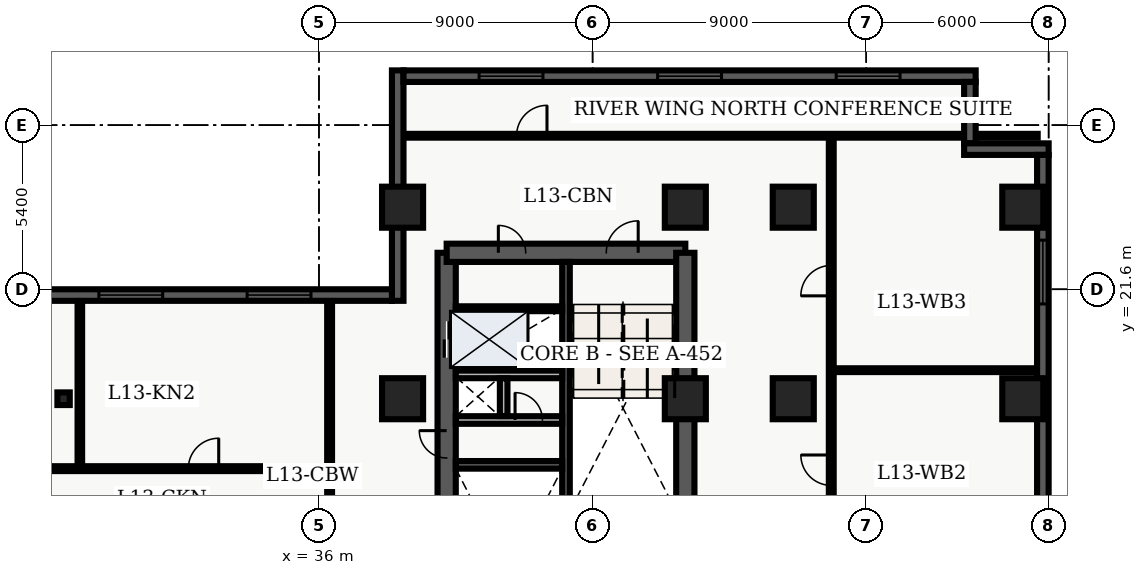
"""IFC4 building model, lengths in metres.
Left out: names, types, materials, properties, quantities, classifications, styles, units other than length and angle.
Written with IfcOpenShell. Run it as: python <this file> out.ifc"""

import sys

from ifc_helpers import new_model, entity, si_unit, converted_unit, direction, frame, origin_with_axes, origin_2d_with_axis, place, context, subcontext, project, spatial, polyline, rectangle, i_section, outline, extrude, element, fill, save


model = new_model("IFC4")
c1 = context("Model", 3, precision=1e-05, world=origin_with_axes(), true_north=direction((0.0, 1.0)))
c2 = subcontext(c1, "Body", "Model", "MODEL_VIEW")
j1 = project(units=[si_unit("LENGTHUNIT", "METRE"), converted_unit("PLANEANGLEUNIT", "DEGREE", entity("IfcPlaneAngleMeasure", 0.017), si_unit("PLANEANGLEUNIT", "RADIAN"), dimensions=[0, 0, 0, 0, 0, 0, 0])], contexts=[c1])
p1 = place(None, origin_with_axes())
s1 = spatial("IfcSite", under=j1, at=p1, CompositionType="ELEMENT")
p2 = place(p1, origin_with_axes())
s2 = spatial("IfcBuilding", under=s1, at=p2, CompositionType="ELEMENT")
p3 = place(p2, frame((0.0, 0.0, 56.1), z_axis=(0.0, 0.0, 1.0), x_axis=(1.0, 0.0, 0.0)))
s3 = spatial("IfcBuildingStorey", under=s2, at=p3, CompositionType="ELEMENT", Elevation=56.1)
p4 = place(p3, frame((40.2, 7.2, 0.0), z_axis=(0.0, 0.0, 1.0), x_axis=(0.0, 1.0, 0.0)))
e1 = element("IfcWall", 1, at=p4, inside=s3, PredefinedType="SHEAR", context=c2, shape_type="SweptSolid", body=[
    extrude(outline(polyline([(0.0, -0.3), (15.6, -0.3), (15.6, 0.3), (0.0, 0.3), (0.0, -0.3)])), origin_with_axes(), (0.0, 0.0, 1.0), 3.66),
])
p5 = place(p4, frame((12.75, 0.0, 0.0), z_axis=(0.0, 0.0, 1.0), x_axis=(1.0, 0.0, 0.0)))
e2 = element("IfcOpeningElement", 2, at=p5, cuts=e1, PredefinedType="OPENING", context=c2, shape_type="SweptSolid", body=[
    extrude(rectangle(XDim=1.2, YDim=0.62, at=origin_2d_with_axis()), origin_with_axes(), (0.0, 0.0, 1.0), 2.15),
])
p6 = place(p4, frame((9.3, 0.0, 0.0), z_axis=(0.0, 0.0, 1.0), x_axis=(1.0, 0.0, 0.0)))
e3 = element("IfcOpeningElement", 3, at=p6, cuts=e1, PredefinedType="OPENING", context=c2, shape_type="SweptSolid", body=[
    extrude(rectangle(XDim=0.9, YDim=0.62, at=origin_2d_with_axis()), origin_with_axes(), (0.0, 0.0, 1.0), 2.15),
])
p7 = place(p3, frame((40.2, 22.8, 0.0), z_axis=(0.0, 0.0, 1.0), x_axis=(1.0, 0.0, 0.0)))
e4 = element("IfcWall", 4, at=p7, inside=s3, PredefinedType="SHEAR", context=c2, shape_type="SweptSolid", body=[
    extrude(outline(polyline([(0.0, -0.3), (7.85, -0.3), (7.85, 0.3), (0.0, 0.3), (0.0, -0.3)])), origin_with_axes(), (0.0, 0.0, 1.0), 3.66),
])
p8 = place(p7, frame((5.775, 0.0, 0.0), z_axis=(0.0, 0.0, 1.0), x_axis=(1.0, 0.0, 0.0)))
e5 = element("IfcOpeningElement", 5, at=p8, cuts=e4, PredefinedType="OPENING", context=c2, shape_type="SweptSolid", body=[
    extrude(rectangle(XDim=1.05, YDim=0.62, at=origin_2d_with_axis()), origin_with_axes(), (0.0, 0.0, 1.0), 2.15),
])
p9 = place(p7, frame((2.15, 0.0, 0.0), z_axis=(0.0, 0.0, 1.0), x_axis=(1.0, 0.0, 0.0)))
e6 = element("IfcOpeningElement", 6, at=p9, cuts=e4, PredefinedType="OPENING", context=c2, shape_type="SweptSolid", body=[
    extrude(rectangle(XDim=0.9, YDim=0.62, at=origin_2d_with_axis()), origin_with_axes(), (0.0, 0.0, 1.0), 2.15),
])
p10 = place(p3, frame((48.05, 7.2, 0.0), z_axis=(0.0, 0.0, 1.0), x_axis=(0.0, 1.0, 0.0)))
e7 = element("IfcWall", 7, at=p10, inside=s3, PredefinedType="SHEAR", context=c2, shape_type="SweptSolid", body=[
    extrude(outline(polyline([(0.0, -0.3), (15.6, -0.3), (15.6, 0.3), (0.0, 0.3), (0.0, -0.3)])), origin_with_axes(), (0.0, 0.0, 1.0), 3.66),
])
p11 = place(p10, frame((1.425, 0.0, 0.0), z_axis=(0.0, 0.0, 1.0), x_axis=(1.0, 0.0, 0.0)))
e8 = element("IfcOpeningElement", 8, at=p11, cuts=e7, PredefinedType="OPENING", context=c2, shape_type="SweptSolid", body=[
    extrude(rectangle(XDim=1.05, YDim=0.62, at=origin_2d_with_axis()), origin_with_axes(), (0.0, 0.0, 1.0), 2.15),
])
p12 = place(p10, frame((3.475, 0.0, 0.0), z_axis=(0.0, 0.0, 1.0), x_axis=(1.0, 0.0, 0.0)))
e9 = element("IfcOpeningElement", 9, at=p12, cuts=e7, PredefinedType="OPENING", context=c2, shape_type="SweptSolid", body=[
    extrude(rectangle(XDim=1.05, YDim=0.62, at=origin_2d_with_axis()), origin_with_axes(), (0.0, 0.0, 1.0), 2.15),
])
p13 = place(p10, frame((5.625, 0.0, 0.0), z_axis=(0.0, 0.0, 1.0), x_axis=(1.0, 0.0, 0.0)))
e10 = element("IfcOpeningElement", 10, at=p13, cuts=e7, PredefinedType="OPENING", context=c2, shape_type="SweptSolid", body=[
    extrude(rectangle(XDim=0.95, YDim=0.62, at=origin_2d_with_axis()), origin_with_axes(), (0.0, 0.0, 1.0), 2.15),
])
p14 = place(p3, frame((44.125, 7.5, 0.0), z_axis=(0.0, 0.0, 1.0), x_axis=(0.0, 1.0, 0.0)))
e11 = element("IfcWall", 11, at=p14, inside=s3, PredefinedType="SHEAR", context=c2, shape_type="SweptSolid", body=[
    extrude(outline(polyline([(0.0, -0.125), (15.0, -0.125), (15.0, 0.125), (0.0, 0.125), (0.0, -0.125)])), origin_with_axes(), (0.0, 0.0, 1.0), 3.66),
])
p15 = place(p3, frame((40.5, 15.825, 0.0), z_axis=(0.0, 0.0, 1.0), x_axis=(1.0, 0.0, 0.0)))
e12 = element("IfcWall", 12, at=p15, inside=s3, PredefinedType="SHEAR", context=c2, shape_type="SweptSolid", body=[
    extrude(outline(polyline([(0.0, -0.125), (3.5, -0.125), (3.5, 0.125), (0.0, 0.125), (0.0, -0.125)])), origin_with_axes(), (0.0, 0.0, 1.0), 3.66),
])
p16 = place(p3, frame((40.5, 17.3, 0.0), z_axis=(0.0, 0.0, 1.0), x_axis=(1.0, 0.0, 0.0)))
e13 = element("IfcWall", 13, at=p16, inside=s3, PredefinedType="SOLIDWALL", context=c2, shape_type="SweptSolid", body=[
    extrude(outline(polyline([(0.0, -0.125), (3.5, -0.125), (3.5, 0.125), (0.0, 0.125), (0.0, -0.125)])), origin_with_axes(), (0.0, 0.0, 1.0), 2.7),
])
p17 = place(p16, frame((2.4, 0.0, 0.0), z_axis=(0.0, 0.0, 1.0), x_axis=(1.0, 0.0, 0.0)))
e14 = element("IfcOpeningElement", 14, at=p17, cuts=e13, PredefinedType="OPENING", context=c2, shape_type="SweptSolid", body=[
    extrude(rectangle(XDim=0.9, YDim=0.27, at=origin_2d_with_axis()), origin_with_axes(), (0.0, 0.0, 1.0), 2.15),
])
p18 = place(p3, frame((40.5, 18.8, 0.0), z_axis=(0.0, 0.0, 1.0), x_axis=(1.0, 0.0, 0.0)))
e15 = element("IfcWall", 15, at=p18, inside=s3, PredefinedType="SOLIDWALL", context=c2, shape_type="SweptSolid", body=[
    extrude(outline(polyline([(0.0, -0.125), (3.5, -0.125), (3.5, 0.125), (0.0, 0.125), (0.0, -0.125)])), origin_with_axes(), (0.0, 0.0, 1.0), 2.7),
])
p19 = place(p3, frame((42.075, 17.43, 0.0), z_axis=(0.0, 0.0, 1.0), x_axis=(0.0, 1.0, 0.0)))
e16 = element("IfcWall", 16, at=p19, inside=s3, PredefinedType="SOLIDWALL", context=c2, shape_type="SweptSolid", body=[
    extrude(outline(polyline([(0.0, -0.125), (1.24, -0.125), (1.24, 0.125), (0.0, 0.125), (0.0, -0.125)])), origin_with_axes(), (0.0, 0.0, 1.0), 2.7),
])
p20 = place(p3, frame((27.6, 18.0, 0.0), z_axis=(0.0, 0.0, 1.0), x_axis=(1.0, 0.0, 0.0)))
e17 = element("IfcColumn", 17, at=p20, inside=s3, PredefinedType="COLUMN", context=c2, shape_type="SweptSolid", body=[
    extrude(i_section(OverallWidth=0.406, OverallDepth=0.416, WebThickness=0.03, FlangeThickness=0.048, FilletRadius=0.022, at=origin_2d_with_axis()), origin_with_axes(), (0.0, 0.0, 1.0), 3.9),
])
for number, where, z_axis, x_axis in (
    (18, (38.75, 18.0, 0.0), (0.0, 0.0, 1.0), (1.0, 0.0, 0.0)),
    (19, (38.75, 24.3, 0.0), (0.0, 0.0, 1.0), (1.0, 0.0, 0.0)),
    (20, (48.05, 18.0, 0.0), (0.0, 0.0, 1.0), (1.0, 0.0, 0.0)),
    (21, (48.05, 24.3, 0.0), (0.0, 0.0, 1.0), (1.0, 0.0, 0.0)),
    (22, (51.6, 18.0, 0.0), (0.0, 0.0, 1.0), (1.0, 0.0, 0.0)),
    (23, (51.6, 24.3, 0.0), (0.0, 0.0, 1.0), (1.0, 0.0, 0.0)),
    (24, (59.15, 18.0, 0.0), (0.0, 0.0, 1.0), (1.0, 0.0, 0.0)),
    (25, (59.15, 24.3, 0.0), (0.0, 0.0, 1.0), (1.0, 0.0, 0.0)),
):
    element("IfcColumn", number, at=place(p3, frame(where, z_axis=z_axis, x_axis=x_axis)), inside=s3, PredefinedType="COLUMN", context=c2, shape_type="SweptSolid", body=[
        extrude(rectangle(XDim=1.35, YDim=1.35, at=origin_2d_with_axis()), origin_with_axes(), (0.0, 0.0, 1.0), 3.9),
    ])
p21 = place(p3, frame((40.5, 20.96, 0.0), z_axis=(0.0, 0.0, 1.0), x_axis=(1.0, 0.0, 0.0)))
e26 = element("IfcWall", 26, at=p21, inside=s3, PredefinedType="PARTITIONING", context=c2, shape_type="SweptSolid", body=[
    extrude(outline(polyline([(0.0, -0.08), (3.5, -0.08), (3.5, 0.08), (0.0, 0.08), (0.0, -0.08)])), origin_with_axes(), (0.0, 0.0, 1.0), 2.7),
])
p22 = place(p3, frame((21.15, 15.7, 0.0), z_axis=(0.0, 0.0, 1.0), x_axis=(1.0, 0.0, 0.0)))
e27 = element("IfcWall", 27, at=p22, inside=s3, PredefinedType="PARTITIONING", context=c2, shape_type="SweptSolid", body=[
    extrude(outline(polyline([(0.0, -0.08), (15.2, -0.08), (15.2, 0.08), (0.0, 0.08), (0.0, -0.08)])), origin_with_axes(), (0.0, 0.0, 1.0), 2.7),
])
p23 = place(p22, frame((3.583, 0.0, 0.0), z_axis=(0.0, 0.0, 1.0), x_axis=(1.0, 0.0, 0.0)))
e28 = element("IfcOpeningElement", 28, at=p23, cuts=e27, PredefinedType="OPENING", context=c2, shape_type="SweptSolid", body=[
    extrude(rectangle(XDim=1.0, YDim=0.18, at=origin_2d_with_axis()), origin_with_axes(), (0.0, 0.0, 1.0), 2.15),
])
p24 = place(p22, frame((11.053, 0.0, 0.0), z_axis=(0.0, 0.0, 1.0), x_axis=(1.0, 0.0, 0.0)))
e29 = element("IfcOpeningElement", 29, at=p24, cuts=e27, PredefinedType="OPENING", context=c2, shape_type="SweptSolid", body=[
    extrude(rectangle(XDim=1.0, YDim=0.18, at=origin_2d_with_axis()), origin_with_axes(), (0.0, 0.0, 1.0), 2.15),
])
p25 = place(p3, frame((36.35, 4.35, 0.0), z_axis=(0.0, 0.0, 1.0), x_axis=(0.0, 1.0, 0.0)))
e30 = element("IfcWall", 30, at=p25, inside=s3, PredefinedType="PARTITIONING", context=c2, shape_type="SweptSolid", body=[
    extrude(outline(polyline([(0.0, -0.08), (16.95, -0.08), (16.95, 0.08), (0.0, 0.08), (0.0, -0.08)])), origin_with_axes(), (0.0, 0.0, 1.0), 2.7),
])
p26 = place(p3, frame((28.135, 15.82, 0.0), z_axis=(0.0, 0.0, 1.0), x_axis=(0.0, 1.0, 0.0)))
e31 = element("IfcWall", 31, at=p26, inside=s3, PredefinedType="PARTITIONING", context=c2, shape_type="SweptSolid", body=[
    extrude(outline(polyline([(0.0, -0.075), (5.405, -0.075), (5.405, 0.075), (0.0, 0.075), (0.0, -0.075)])), origin_with_axes(), (0.0, 0.0, 1.0), 2.7),
])
p27 = place(p3, frame((52.85, 7.85, 0.0), z_axis=(0.0, 0.0, 1.0), x_axis=(0.0, 1.0, 0.0)))
e32 = element("IfcWall", 32, at=p27, inside=s3, PredefinedType="PARTITIONING", context=c2, shape_type="SweptSolid", body=[
    extrude(outline(polyline([(0.0, -0.08), (18.8, -0.08), (18.8, 0.08), (0.0, 0.08), (0.0, -0.08)])), origin_with_axes(), (0.0, 0.0, 1.0), 2.7),
])
p28 = place(p27, frame((4.4, 0.0, 0.0), z_axis=(0.0, 0.0, 1.0), x_axis=(1.0, 0.0, 0.0)))
e33 = element("IfcOpeningElement", 33, at=p28, cuts=e32, PredefinedType="OPENING", context=c2, shape_type="SweptSolid", body=[
    extrude(rectangle(XDim=1.0, YDim=0.18, at=origin_2d_with_axis()), origin_with_axes(), (0.0, 0.0, 1.0), 2.15),
])
p29 = place(p27, frame((7.799, 0.0, 0.0), z_axis=(0.0, 0.0, 1.0), x_axis=(1.0, 0.0, 0.0)))
e34 = element("IfcOpeningElement", 34, at=p29, cuts=e32, PredefinedType="OPENING", context=c2, shape_type="SweptSolid", body=[
    extrude(rectangle(XDim=1.0, YDim=0.18, at=origin_2d_with_axis()), origin_with_axes(), (0.0, 0.0, 1.0), 2.15),
])
p30 = place(p27, frame((14.034, 0.0, 0.0), z_axis=(0.0, 0.0, 1.0), x_axis=(1.0, 0.0, 0.0)))
e35 = element("IfcOpeningElement", 35, at=p30, cuts=e32, PredefinedType="OPENING", context=c2, shape_type="SweptSolid", body=[
    extrude(rectangle(XDim=1.0, YDim=0.18, at=origin_2d_with_axis()), origin_with_axes(), (0.0, 0.0, 1.0), 2.15),
])
p31 = place(p3, frame((38.76, 26.65, 0.0), z_axis=(0.0, 0.0, 1.0), x_axis=(1.0, 0.0, 0.0)))
e36 = element("IfcWall", 36, at=p31, inside=s3, PredefinedType="PARTITIONING", context=c2, shape_type="SweptSolid", body=[
    extrude(outline(polyline([(0.0, -0.062), (20.88, -0.062), (20.88, 0.062), (0.0, 0.062), (0.0, -0.062)])), origin_with_axes(), (0.0, 0.0, 1.0), 2.7),
])
p32 = place(p31, frame((4.24, 0.0, 0.0), z_axis=(0.0, 0.0, 1.0), x_axis=(1.0, 0.0, 0.0)))
e37 = element("IfcOpeningElement", 37, at=p32, cuts=e36, PredefinedType="OPENING", context=c2, shape_type="SweptSolid", body=[
    extrude(rectangle(XDim=1.0, YDim=0.145, at=origin_2d_with_axis()), origin_with_axes(), (0.0, 0.0, 1.0), 2.15),
])
p33 = place(p3, frame((52.97, 18.939, 0.0), z_axis=(0.0, 0.0, 1.0), x_axis=(1.0, 0.0, 0.0)))
e38 = element("IfcWall", 38, at=p33, inside=s3, PredefinedType="PARTITIONING", context=c2, shape_type="SweptSolid", body=[
    extrude(outline(polyline([(0.0, -0.062), (6.655, -0.062), (6.655, 0.062), (0.0, 0.062), (0.0, -0.062)])), origin_with_axes(), (0.0, 0.0, 1.0), 2.7),
])
p34 = place(p3, frame((38.59, 21.22, 0.0), z_axis=(0.0, 0.0, 1.0), x_axis=(0.0, 1.0, 0.0)))
e39 = element("IfcWall", 39, at=p34, inside=s3, PredefinedType="SOLIDWALL", context=c2, shape_type="SweptSolid", body=[
    extrude(outline(polyline([(0.0, -0.19), (7.58, -0.19), (7.58, 0.19), (0.0, 0.19), (0.0, -0.19)])), origin_with_axes(), (0.0, 0.0, 1.0), 3.66),
])
p35 = place(p3, frame((38.78, 28.61, 0.0), z_axis=(0.0, 0.0, 1.0), x_axis=(1.0, 0.0, 0.0)))
e40 = element("IfcWall", 40, at=p35, inside=s3, PredefinedType="SOLIDWALL", context=c2, shape_type="SweptSolid", body=[
    extrude(outline(polyline([(0.0, -0.19), (18.82, -0.19), (18.82, 0.19), (0.0, 0.19), (0.0, -0.19)])), origin_with_axes(), (0.0, 0.0, 1.0), 3.66),
])
p36 = place(p35, frame((3.537, 0.0, 0.45), z_axis=(0.0, 0.0, 1.0), x_axis=(1.0, 0.0, 0.0)))
e41 = element("IfcOpeningElement", 41, at=p36, cuts=e40, PredefinedType="OPENING", context=c2, shape_type="SweptSolid", body=[
    extrude(rectangle(XDim=2.1, YDim=0.4, at=origin_2d_with_axis()), origin_with_axes(), (0.0, 0.0, 1.0), 2.2),
])
p37 = place(p35, frame((9.41, 0.0, 0.45), z_axis=(0.0, 0.0, 1.0), x_axis=(1.0, 0.0, 0.0)))
e42 = element("IfcOpeningElement", 42, at=p37, cuts=e40, PredefinedType="OPENING", context=c2, shape_type="SweptSolid", body=[
    extrude(rectangle(XDim=2.1, YDim=0.4, at=origin_2d_with_axis()), origin_with_axes(), (0.0, 0.0, 1.0), 2.2),
])
p38 = place(p35, frame((15.283, 0.0, 0.45), z_axis=(0.0, 0.0, 1.0), x_axis=(1.0, 0.0, 0.0)))
e43 = element("IfcOpeningElement", 43, at=p38, cuts=e40, PredefinedType="OPENING", context=c2, shape_type="SweptSolid", body=[
    extrude(rectangle(XDim=2.1, YDim=0.4, at=origin_2d_with_axis()), origin_with_axes(), (0.0, 0.0, 1.0), 2.2),
])
p39 = place(p3, frame((57.41, 28.42, 0.0), z_axis=(0.0, 0.0, 1.0), x_axis=(0.0, -1.0, 0.0)))
e44 = element("IfcWall", 44, at=p39, inside=s3, PredefinedType="SOLIDWALL", context=c2, shape_type="SweptSolid", body=[
    extrude(outline(polyline([(0.0, -0.19), (2.02, -0.19), (2.02, 0.19), (0.0, 0.19), (0.0, -0.19)])), origin_with_axes(), (0.0, 0.0, 1.0), 3.66),
])
p40 = place(p3, frame((57.22, 26.21, 0.0), z_axis=(0.0, 0.0, 1.0), x_axis=(1.0, 0.0, 0.0)))
e45 = element("IfcWall", 45, at=p40, inside=s3, PredefinedType="SOLIDWALL", context=c2, shape_type="SweptSolid", body=[
    extrude(outline(polyline([(0.0, -0.19), (2.78, -0.19), (2.78, 0.19), (0.0, 0.19), (0.0, -0.19)])), origin_with_axes(), (0.0, 0.0, 1.0), 3.66),
])
p41 = place(p3, frame((59.81, 26.02, 0.0), z_axis=(0.0, 0.0, 1.0), x_axis=(0.0, -1.0, 0.0)))
e46 = element("IfcWall", 46, at=p41, inside=s3, PredefinedType="SOLIDWALL", context=c2, shape_type="SweptSolid", body=[
    extrude(outline(polyline([(0.0, -0.19), (23.62, -0.19), (23.62, 0.19), (0.0, 0.19), (0.0, -0.19)])), origin_with_axes(), (0.0, 0.0, 1.0), 3.66),
])
p42 = place(p41, frame((3.853, 0.0, 0.45), z_axis=(0.0, 0.0, 1.0), x_axis=(1.0, 0.0, 0.0)))
e47 = element("IfcOpeningElement", 47, at=p42, cuts=e46, PredefinedType="OPENING", context=c2, shape_type="SweptSolid", body=[
    extrude(rectangle(XDim=2.1, YDim=0.4, at=origin_2d_with_axis()), origin_with_axes(), (0.0, 0.0, 1.0), 2.2),
])
p43 = place(p41, frame((20.218, 0.0, 0.45), z_axis=(0.0, 0.0, 1.0), x_axis=(1.0, 0.0, 0.0)))
e48 = element("IfcOpeningElement", 48, at=p43, cuts=e46, PredefinedType="OPENING", context=c2, shape_type="SweptSolid", body=[
    extrude(rectangle(XDim=2.1, YDim=0.4, at=origin_2d_with_axis()), origin_with_axes(), (0.0, 0.0, 1.0), 2.2),
])
p44 = place(p3, frame((21.22, 21.41, 0.0), z_axis=(0.0, 0.0, 1.0), x_axis=(1.0, 0.0, 0.0)))
e49 = element("IfcWall", 49, at=p44, inside=s3, PredefinedType="SOLIDWALL", context=c2, shape_type="SweptSolid", body=[
    extrude(outline(polyline([(0.0, -0.19), (17.18, -0.19), (17.18, 0.19), (0.0, 0.19), (0.0, -0.19)])), origin_with_axes(), (0.0, 0.0, 1.0), 3.66),
])
p45 = place(p44, frame((3.263, 0.0, 0.45), z_axis=(0.0, 0.0, 1.0), x_axis=(1.0, 0.0, 0.0)))
e50 = element("IfcOpeningElement", 50, at=p45, cuts=e49, PredefinedType="OPENING", context=c2, shape_type="SweptSolid", body=[
    extrude(rectangle(XDim=2.1, YDim=0.4, at=origin_2d_with_axis()), origin_with_axes(), (0.0, 0.0, 1.0), 2.2),
])
p46 = place(p44, frame((8.59, 0.0, 0.45), z_axis=(0.0, 0.0, 1.0), x_axis=(1.0, 0.0, 0.0)))
e51 = element("IfcOpeningElement", 51, at=p46, cuts=e49, PredefinedType="OPENING", context=c2, shape_type="SweptSolid", body=[
    extrude(rectangle(XDim=2.1, YDim=0.4, at=origin_2d_with_axis()), origin_with_axes(), (0.0, 0.0, 1.0), 2.2),
])
p47 = place(p44, frame((13.467, 0.0, 0.45), z_axis=(0.0, 0.0, 1.0), x_axis=(1.0, 0.0, 0.0)))
e52 = element("IfcOpeningElement", 52, at=p47, cuts=e49, PredefinedType="OPENING", context=c2, shape_type="SweptSolid", body=[
    extrude(rectangle(XDim=2.1, YDim=0.4, at=origin_2d_with_axis()), origin_with_axes(), (0.0, 0.0, 1.0), 2.2),
])
p48 = place(p4, frame((12.75, 0.0, 0.0), z_axis=(0.0, 0.0, 1.0), x_axis=(1.0, 0.0, 0.0)))
e53 = element("IfcDoor", 53, at=p48, inside=s3, OperationType="DOUBLE_DOOR_SLIDING", PredefinedType="DOOR", context=c2, shape_type="SweptSolid", body=[
    extrude(rectangle(XDim=1.2, YDim=0.09, at=origin_2d_with_axis()), origin_with_axes(), (0.0, 0.0, 1.0), 2.15),
])
fill(e2, e53)
p49 = place(p4, frame((9.3, 0.0, 0.0), z_axis=(0.0, 0.0, 1.0), x_axis=(1.0, 0.0, 0.0)))
e54 = element("IfcDoor", 54, at=p49, inside=s3, OperationType="SINGLE_SWING_RIGHT", PredefinedType="DOOR", context=c2, shape_type="SweptSolid", body=[
    extrude(rectangle(XDim=0.9, YDim=0.09, at=origin_2d_with_axis()), origin_with_axes(), (0.0, 0.0, 1.0), 2.15),
])
fill(e3, e54)
p50 = place(p16, frame((2.4, 0.0, 0.0), z_axis=(0.0, 0.0, 1.0), x_axis=(1.0, 0.0, 0.0)))
e55 = element("IfcDoor", 55, at=p50, inside=s3, OperationType="SINGLE_SWING_LEFT", PredefinedType="DOOR", context=c2, shape_type="SweptSolid", body=[
    extrude(rectangle(XDim=0.9, YDim=0.09, at=origin_2d_with_axis()), origin_with_axes(), (0.0, 0.0, 1.0), 2.15),
])
fill(e14, e55)
p51 = place(p7, frame((5.775, 0.0, 0.0), z_axis=(0.0, 0.0, 1.0), x_axis=(1.0, 0.0, 0.0)))
e56 = element("IfcDoor", 56, at=p51, inside=s3, OperationType="SINGLE_SWING_RIGHT", PredefinedType="DOOR", context=c2, shape_type="SweptSolid", body=[
    extrude(rectangle(XDim=1.05, YDim=0.09, at=origin_2d_with_axis()), origin_with_axes(), (0.0, 0.0, 1.0), 2.15),
])
fill(e5, e56)
p52 = place(p7, frame((2.15, 0.0, 0.0), z_axis=(0.0, 0.0, 1.0), x_axis=(1.0, 0.0, 0.0)))
e57 = element("IfcDoor", 57, at=p52, inside=s3, OperationType="SINGLE_SWING_LEFT", PredefinedType="DOOR", context=c2, shape_type="SweptSolid", body=[
    extrude(rectangle(XDim=0.9, YDim=0.09, at=origin_2d_with_axis()), origin_with_axes(), (0.0, 0.0, 1.0), 2.15),
])
fill(e6, e57)
p53 = place(p22, frame((11.053, 0.0, 0.0), z_axis=(0.0, 0.0, 1.0), x_axis=(1.0, 0.0, 0.0)))
e58 = element("IfcDoor", 58, at=p53, inside=s3, OperationType="SINGLE_SWING_RIGHT", PredefinedType="DOOR", context=c2, shape_type="SweptSolid", body=[
    extrude(rectangle(XDim=1.0, YDim=0.09, at=origin_2d_with_axis()), origin_with_axes(), (0.0, 0.0, 1.0), 2.15),
])
fill(e29, e58)
p54 = place(p31, frame((4.24, 0.0, 0.0), z_axis=(0.0, 0.0, 1.0), x_axis=(1.0, 0.0, 0.0)))
e59 = element("IfcDoor", 59, at=p54, inside=s3, OperationType="SINGLE_SWING_RIGHT", PredefinedType="DOOR", context=c2, shape_type="SweptSolid", body=[
    extrude(rectangle(XDim=1.0, YDim=0.075, at=origin_2d_with_axis()), origin_with_axes(), (0.0, 0.0, 1.0), 2.15),
])
fill(e37, e59)
p55 = place(p27, frame((7.799, 0.0, 0.0), z_axis=(0.0, 0.0, 1.0), x_axis=(1.0, 0.0, 0.0)))
e60 = element("IfcDoor", 60, at=p55, inside=s3, OperationType="SINGLE_SWING_RIGHT", PredefinedType="DOOR", context=c2, shape_type="SweptSolid", body=[
    extrude(rectangle(XDim=1.0, YDim=0.09, at=origin_2d_with_axis()), origin_with_axes(), (0.0, 0.0, 1.0), 2.15),
])
fill(e34, e60)
p56 = place(p27, frame((14.034, 0.0, 0.0), z_axis=(0.0, 0.0, 1.0), x_axis=(1.0, 0.0, 0.0)))
e61 = element("IfcDoor", 61, at=p56, inside=s3, OperationType="SINGLE_SWING_LEFT", PredefinedType="DOOR", context=c2, shape_type="SweptSolid", body=[
    extrude(rectangle(XDim=1.0, YDim=0.09, at=origin_2d_with_axis()), origin_with_axes(), (0.0, 0.0, 1.0), 2.15),
])
fill(e35, e61)
p57 = place(p35, frame((3.537, 0.0, 0.45), z_axis=(0.0, 0.0, 1.0), x_axis=(1.0, 0.0, 0.0)))
e62 = element("IfcWindow", 62, at=p57, inside=s3, PredefinedType="WINDOW", context=c2, shape_type="SweptSolid", body=[
    extrude(rectangle(XDim=2.1, YDim=0.09, at=origin_2d_with_axis()), origin_with_axes(), (0.0, 0.0, 1.0), 2.2),
])
fill(e41, e62)
p58 = place(p35, frame((9.41, 0.0, 0.45), z_axis=(0.0, 0.0, 1.0), x_axis=(1.0, 0.0, 0.0)))
e63 = element("IfcWindow", 63, at=p58, inside=s3, PredefinedType="WINDOW", context=c2, shape_type="SweptSolid", body=[
    extrude(rectangle(XDim=2.1, YDim=0.09, at=origin_2d_with_axis()), origin_with_axes(), (0.0, 0.0, 1.0), 2.2),
])
fill(e42, e63)
p59 = place(p35, frame((15.283, 0.0, 0.45), z_axis=(0.0, 0.0, 1.0), x_axis=(1.0, 0.0, 0.0)))
e64 = element("IfcWindow", 64, at=p59, inside=s3, PredefinedType="WINDOW", context=c2, shape_type="SweptSolid", body=[
    extrude(rectangle(XDim=2.1, YDim=0.09, at=origin_2d_with_axis()), origin_with_axes(), (0.0, 0.0, 1.0), 2.2),
])
fill(e43, e64)
p60 = place(p41, frame((3.853, 0.0, 0.45), z_axis=(0.0, 0.0, 1.0), x_axis=(1.0, 0.0, 0.0)))
e65 = element("IfcWindow", 65, at=p60, inside=s3, PredefinedType="WINDOW", context=c2, shape_type="SweptSolid", body=[
    extrude(rectangle(XDim=2.1, YDim=0.09, at=origin_2d_with_axis()), origin_with_axes(), (0.0, 0.0, 1.0), 2.2),
])
fill(e47, e65)
p61 = place(p44, frame((8.59, 0.0, 0.45), z_axis=(0.0, 0.0, 1.0), x_axis=(1.0, 0.0, 0.0)))
e66 = element("IfcWindow", 66, at=p61, inside=s3, PredefinedType="WINDOW", context=c2, shape_type="SweptSolid", body=[
    extrude(rectangle(XDim=2.1, YDim=0.09, at=origin_2d_with_axis()), origin_with_axes(), (0.0, 0.0, 1.0), 2.2),
])
fill(e51, e66)
p62 = place(p44, frame((13.467, 0.0, 0.45), z_axis=(0.0, 0.0, 1.0), x_axis=(1.0, 0.0, 0.0)))
e67 = element("IfcWindow", 67, at=p62, inside=s3, PredefinedType="WINDOW", context=c2, shape_type="SweptSolid", body=[
    extrude(rectangle(XDim=2.1, YDim=0.09, at=origin_2d_with_axis()), origin_with_axes(), (0.0, 0.0, 1.0), 2.2),
])
fill(e52, e67)
save(model, sys.argv[1])
